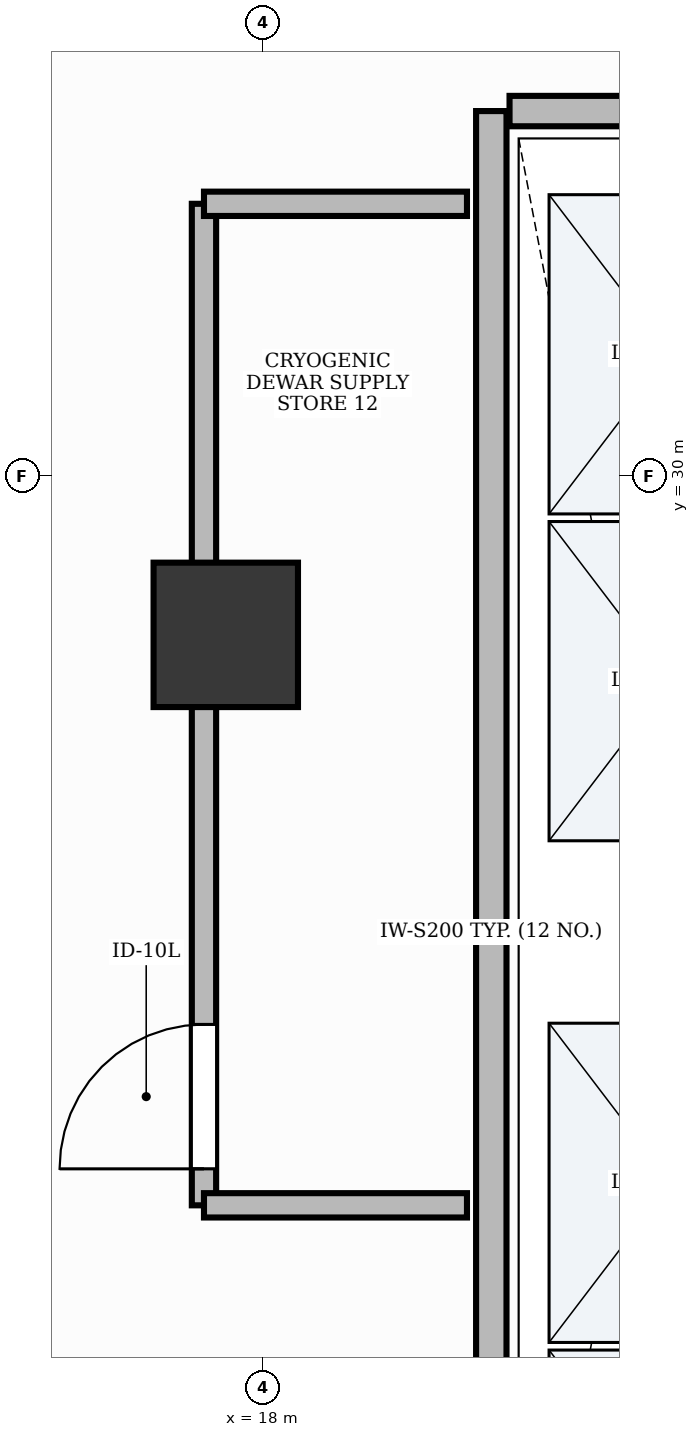
"""IFC4 building model, lengths in metres.
Left out: names, types, materials, properties, quantities, classifications, styles, units other than length and angle.
Written with IfcOpenShell. Run it as: python <this file> out.ifc"""

import sys

from ifc_helpers import new_model, si_unit, direction, frame, frame_2d, origin, origin_2d, place, context, subcontext, project, spatial, rectangle, extrude, element, fill, save


model = new_model("IFC4")
c1 = context("Model", 3, precision=1e-05, world=origin(), true_north=direction((0.0, 1.0)))
c2 = subcontext(c1, "Body", "Model", "MODEL_VIEW")
j1 = project(units=[si_unit("LENGTHUNIT", "METRE"), si_unit("PLANEANGLEUNIT", "RADIAN")], contexts=[c1])
p1 = place(None, origin())
s1 = spatial("IfcSite", under=j1, at=p1, CompositionType="ELEMENT")
p2 = place(p1, origin())
s2 = spatial("IfcBuilding", under=s1, at=p2, CompositionType="ELEMENT")
p3 = place(p2, frame((0.0, 0.0, 154.2)))
s3 = spatial("IfcBuildingStorey", under=s2, at=p3, CompositionType="ELEMENT", Elevation=154.2)
p4 = place(p3, frame((17.753, 28.955, -0.0), z_axis=(0.0, 0.0, 1.0), x_axis=(1.0, 0.0, 0.0)))
e1 = element("IfcColumn", 1, at=p4, inside=s3, PredefinedType="COLUMN", context=c2, shape_type="SweptSolid", body=[
    extrude(rectangle(XDim=0.95, YDim=0.95, at=origin_2d()), origin(), (0.0, 0.0, 1.0), 3.901),
])
p5 = place(p3, frame((19.5, 21.6, 0.0), z_axis=(0.0, 0.0, 1.0), x_axis=(0.0, 1.0, 0.0)))
e2 = element("IfcWall", 2, at=p5, inside=s3, PredefinedType="PARTITIONING", context=c2, shape_type="SweptSolid", body=[
    extrude(rectangle(XDim=10.8, YDim=0.2, at=frame_2d((5.4, 0.0))), origin(), (0.0, 0.0, 1.0), 2.91),
])
p6 = place(p3, frame((19.62, 32.4, 0.0), z_axis=(0.0, 0.0, 1.0), x_axis=(1.0, 0.0, 0.0)))
e3 = element("IfcWall", 3, at=p6, inside=s3, PredefinedType="PARTITIONING", context=c2, shape_type="SweptSolid", body=[
    extrude(rectangle(XDim=2.11, YDim=0.2, at=frame_2d((1.055, 0.0))), origin(), (0.0, 0.0, 1.0), 2.91),
])
p7 = place(p3, frame((17.61, 25.202, 0.0), z_axis=(0.0, 0.0, 1.0), x_axis=(0.0, 1.0, 0.0)))
e4 = element("IfcWall", 4, at=p7, inside=s3, PredefinedType="PARTITIONING", context=c2, shape_type="SweptSolid", body=[
    extrude(rectangle(XDim=6.588, YDim=0.16, at=frame_2d((3.294, 0.0))), origin(), (0.0, 0.0, 1.0), 2.91),
])
p8 = place(p7, frame((0.24, 0.0, 0.0)))
e5 = element("IfcOpeningElement", 5, at=p8, cuts=e4, PredefinedType="OPENING", context=c2, shape_type="SweptSolid", body=[
    extrude(rectangle(XDim=0.95, YDim=2.15, at=frame_2d((0.475, 1.075))), frame((0.0, 0.095, 0.0), z_axis=(0.0, -1.0, 0.0), x_axis=(1.0, 0.0, 0.0)), (0.0, 0.0, 1.0), 0.19),
])
for number, where, z_axis, x_axis in (
    (6, (19.34, 25.202, 0.0), (0.0, 0.0, 1.0), (-1.0, 0.0, 0.0)),
    (7, (17.61, 31.79, 0.0), (0.0, 0.0, 1.0), (1.0, 0.0, 0.0)),
):
    element("IfcWall", number, at=place(p3, frame(where, z_axis=z_axis, x_axis=x_axis)), inside=s3, PredefinedType="PARTITIONING", context=c2, shape_type="SweptSolid", body=[
        extrude(rectangle(XDim=1.73, YDim=0.16, at=frame_2d((0.865, 0.0))), origin(), (0.0, 0.0, 1.0), 2.91),
    ])
p9 = place(p8, origin())
e8 = element("IfcDoor", 8, at=p9, inside=s3, OperationType="SINGLE_SWING_LEFT", PredefinedType="DOOR", context=c2, shape_type="SweptSolid", body=[
    extrude(rectangle(XDim=0.95, YDim=2.15, at=frame_2d((0.475, 1.075))), frame((0.0, 0.025, 0.0), z_axis=(0.0, -1.0, 0.0), x_axis=(1.0, 0.0, 0.0)), (0.0, 0.0, 1.0), 0.05),
])
fill(e5, e8)
save(model, sys.argv[1])
